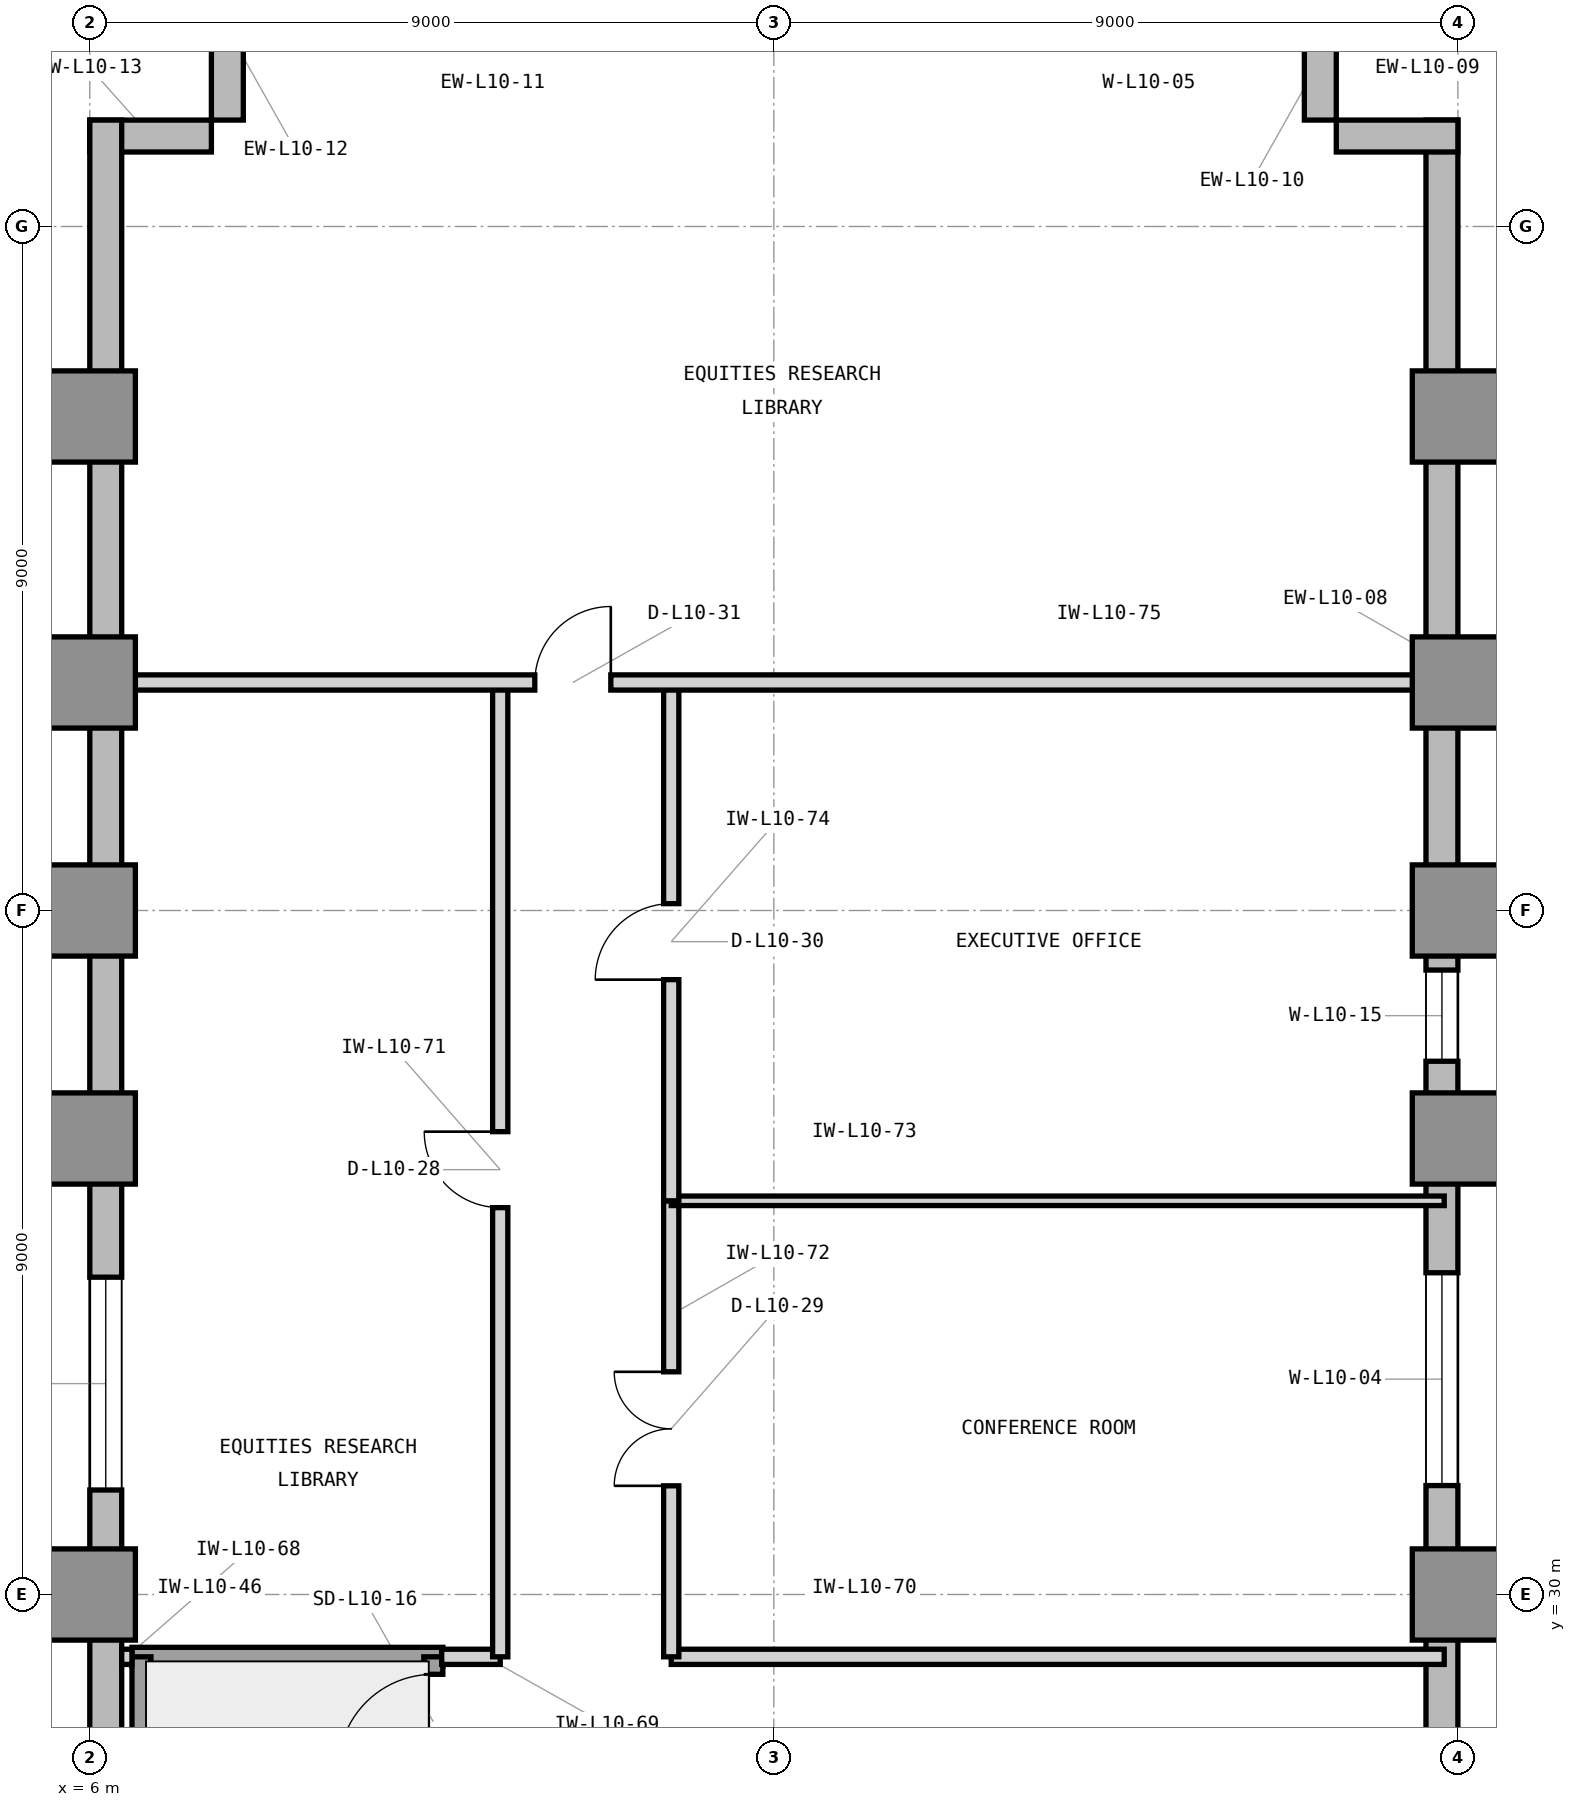
"""IFC4 building model, lengths in metres.
Left out: names, types, materials, properties, quantities, classifications, styles, units other than length and angle.
Written with IfcOpenShell. Run it as: python <this file> out.ifc"""

import sys

from ifc_helpers import new_model, si_unit, direction, frame, frame_2d, origin, origin_2d, place, context, subcontext, project, spatial, rectangle, extrude, element, fill, save


model = new_model("IFC4")
c1 = context("Model", 3, precision=1e-05, world=origin(), true_north=direction((0.0, 1.0)))
c2 = subcontext(c1, "Body", "Model", "MODEL_VIEW")
j1 = project(units=[si_unit("LENGTHUNIT", "METRE"), si_unit("PLANEANGLEUNIT", "RADIAN")], contexts=[c1])
p1 = place(None, origin())
s1 = spatial("IfcSite", under=j1, at=p1, CompositionType="ELEMENT")
p2 = place(p1, origin())
s2 = spatial("IfcBuilding", under=s1, at=p2, CompositionType="ELEMENT")
p3 = place(p2, frame((0.0, 0.0, 46.8)))
s3 = spatial("IfcBuildingStorey", under=s2, at=p3, CompositionType="ELEMENT", Elevation=46.8)
for number, where, z_axis, x_axis in (
    (1, (6.0, 30.0, 0.0), (0.0, 0.0, 1.0), (1.0, 0.0, 0.0)),
    (2, (24.0, 30.0, 0.0), (0.0, 0.0, 1.0), (1.0, 0.0, 0.0)),
    (3, (6.0, 36.0, 0.0), (0.0, 0.0, 1.0), (1.0, 0.0, 0.0)),
    (4, (24.0, 36.0, 0.0), (0.0, 0.0, 1.0), (1.0, 0.0, 0.0)),
    (5, (6.0, 39.0, 0.0), (0.0, 0.0, 1.0), (1.0, 0.0, 0.0)),
    (6, (24.0, 39.0, 0.0), (0.0, 0.0, 1.0), (1.0, 0.0, 0.0)),
    (7, (6.0, 42.0, 0.0), (0.0, 0.0, 1.0), (1.0, 0.0, 0.0)),
    (8, (24.0, 42.0, 0.0), (0.0, 0.0, 1.0), (1.0, 0.0, 0.0)),
    (9, (6.0, 45.5, 0.0), (0.0, 0.0, 1.0), (1.0, 0.0, 0.0)),
    (10, (24.0, 45.5, 0.0), (0.0, 0.0, 1.0), (1.0, 0.0, 0.0)),
):
    element("IfcColumn", number, at=place(p3, frame(where, z_axis=z_axis, x_axis=x_axis)), inside=s3, PredefinedType="COLUMN", context=c2, shape_type="SweptSolid", body=[
        extrude(rectangle(XDim=1.2, YDim=1.2, at=origin_2d()), origin(), (0.0, 0.0, 1.0), 4.2),
    ])
p4 = place(p3, frame((23.79, 21.0, 0.0), z_axis=(0.0, 0.0, 1.0), x_axis=(0.0, 1.0, 0.0)))
e11 = element("IfcWall", 11, at=p4, inside=s3, PredefinedType="STANDARD", context=c2, shape_type="SweptSolid", body=[
    extrude(rectangle(XDim=28.4, YDim=0.42, at=frame_2d((14.2, 0.0))), origin(), (0.0, 0.0, 1.0), 3.98),
])
p5 = place(p4, frame((10.433, 0.0, 0.85)))
e12 = element("IfcOpeningElement", 12, at=p5, cuts=e11, PredefinedType="OPENING", context=c2, shape_type="SweptSolid", body=[
    extrude(rectangle(XDim=2.8, YDim=2.45, at=frame_2d((1.4, 1.225))), frame((0.0, 0.22, 0.0), z_axis=(0.0, -1.0, 0.0), x_axis=(1.0, 0.0, 0.0)), (0.0, 0.0, 1.0), 0.44),
])
p6 = place(p4, frame((16.016, 0.0, 0.85)))
e13 = element("IfcOpeningElement", 13, at=p6, cuts=e11, PredefinedType="OPENING", context=c2, shape_type="SweptSolid", body=[
    extrude(rectangle(XDim=1.2, YDim=2.45, at=frame_2d((0.6, 1.225))), frame((0.0, 0.22, 0.0), z_axis=(0.0, -1.0, 0.0), x_axis=(1.0, 0.0, 0.0)), (0.0, 0.0, 1.0), 0.44),
])
for number, where, z_axis, x_axis in (
    (14, (24.0, 49.19, 0.0), (0.0, 0.0, 1.0), (-1.0, 0.0, 0.0)),
    (15, (22.19, 49.4, 0.0), (0.0, 0.0, 1.0), (0.0, 1.0, 0.0)),
    (16, (7.81, 51.0, 0.0), (0.0, 0.0, 1.0), (0.0, -1.0, 0.0)),
    (17, (7.6, 49.19, 0.0), (0.0, 0.0, 1.0), (-1.0, 0.0, 0.0)),
):
    element("IfcWall", number, at=place(p3, frame(where, z_axis=z_axis, x_axis=x_axis)), inside=s3, PredefinedType="STANDARD", context=c2, shape_type="SweptSolid", body=[
        extrude(rectangle(XDim=1.6, YDim=0.42, at=frame_2d((0.8, 0.0))), origin(), (0.0, 0.0, 1.0), 3.98),
    ])
p7 = place(p3, frame((6.21, 49.4, 0.0), z_axis=(0.0, 0.0, 1.0), x_axis=(0.0, -1.0, 0.0)))
e18 = element("IfcWall", 18, at=p7, inside=s3, PredefinedType="STANDARD", context=c2, shape_type="SweptSolid", body=[
    extrude(rectangle(XDim=28.5, YDim=0.42, at=frame_2d((14.25, 0.0))), origin(), (0.0, 0.0, 1.0), 3.98),
])
p8 = place(p7, frame((15.225, 0.0, 0.85)))
e19 = element("IfcOpeningElement", 19, at=p8, cuts=e18, PredefinedType="OPENING", context=c2, shape_type="SweptSolid", body=[
    extrude(rectangle(XDim=2.8, YDim=2.45, at=frame_2d((1.4, 1.225))), frame((0.0, 0.22, 0.0), z_axis=(0.0, -1.0, 0.0), x_axis=(1.0, 0.0, 0.0)), (0.0, 0.0, 1.0), 0.44),
])
p9 = place(p3, frame((6.555, 29.18, 0.0), z_axis=(0.0, 0.0, 1.0), x_axis=(1.0, 0.0, 0.0)))
e20 = element("IfcWall", 20, at=p9, inside=s3, PredefinedType="SHEAR", context=c2, shape_type="SweptSolid", body=[
    extrude(rectangle(XDim=4.09, YDim=0.25, at=frame_2d((2.045, 0.0))), origin(), (0.0, 0.0, 1.0), 4.2),
])
p10 = place(p3, frame((6.68, 21.68, 0.0), z_axis=(0.0, 0.0, 1.0), x_axis=(0.0, 1.0, 0.0)))
e21 = element("IfcWall", 21, at=p10, inside=s3, PredefinedType="SHEAR", context=c2, shape_type="SweptSolid", body=[
    extrude(rectangle(XDim=7.5, YDim=0.25, at=frame_2d((3.75, 0.0))), origin(), (0.0, 0.0, 1.0), 4.2),
])
p11 = place(p3, frame((10.52, 21.68, 0.0), z_axis=(0.0, 0.0, 1.0), x_axis=(0.0, 1.0, 0.0)))
e22 = element("IfcWall", 22, at=p11, inside=s3, PredefinedType="SHEAR", context=c2, shape_type="SweptSolid", body=[
    extrude(rectangle(XDim=7.5, YDim=0.25, at=frame_2d((3.75, 0.0))), origin(), (0.0, 0.0, 1.0), 4.2),
])
p12 = place(p11, frame((6.02, 0.0, 0.0)))
e23 = element("IfcOpeningElement", 23, at=p12, cuts=e22, PredefinedType="OPENING", context=c2, shape_type="SweptSolid", body=[
    extrude(rectangle(XDim=1.25, YDim=2.2, at=frame_2d((0.625, 1.1))), frame((0.0, 0.135, 0.0), z_axis=(0.0, -1.0, 0.0), x_axis=(1.0, 0.0, 0.0)), (0.0, 0.0, 1.0), 0.27),
])
p13 = place(p3, frame((6.42, 29.18, 0.0), z_axis=(0.0, 0.0, 1.0), x_axis=(1.0, 0.0, 0.0)))
e24 = element("IfcWall", 24, at=p13, inside=s3, PredefinedType="PARTITIONING", context=c2, shape_type="SweptSolid", body=[
    extrude(rectangle(XDim=0.135, YDim=0.2, at=frame_2d((0.067, 0.0))), origin(), (0.0, 0.0, 1.0), 3.97),
])
p14 = place(p3, frame((10.63, 29.18, 0.0), z_axis=(0.0, 0.0, 1.0), x_axis=(1.0, 0.0, 0.0)))
e25 = element("IfcWall", 25, at=p14, inside=s3, PredefinedType="PARTITIONING", context=c2, shape_type="SweptSolid", body=[
    extrude(rectangle(XDim=0.77, YDim=0.2, at=frame_2d((0.385, 0.0))), origin(), (0.0, 0.0, 1.0), 3.97),
])
p15 = place(p3, frame((13.65, 29.18, 0.0), z_axis=(0.0, 0.0, 1.0), x_axis=(1.0, 0.0, 0.0)))
e26 = element("IfcWall", 26, at=p15, inside=s3, PredefinedType="PARTITIONING", context=c2, shape_type="SweptSolid", body=[
    extrude(rectangle(XDim=10.17, YDim=0.2, at=frame_2d((5.085, 0.0))), origin(), (0.0, 0.0, 1.0), 3.97),
])
p16 = place(p3, frame((11.4, 29.18, 0.0), z_axis=(0.0, 0.0, 1.0), x_axis=(0.0, 1.0, 0.0)))
e27 = element("IfcWall", 27, at=p16, inside=s3, PredefinedType="PARTITIONING", context=c2, shape_type="SweptSolid", body=[
    extrude(rectangle(XDim=12.82, YDim=0.2, at=frame_2d((6.41, 0.0))), origin(), (0.0, 0.0, 1.0), 3.97),
])
p17 = place(p16, frame((5.91, 0.0, 0.0)))
e28 = element("IfcOpeningElement", 28, at=p17, cuts=e27, PredefinedType="OPENING", context=c2, shape_type="SweptSolid", body=[
    extrude(rectangle(XDim=1.0, YDim=2.15, at=frame_2d((0.5, 1.075))), frame((0.0, 0.11, 0.0), z_axis=(0.0, -1.0, 0.0), x_axis=(1.0, 0.0, 0.0)), (0.0, 0.0, 1.0), 0.22),
])
p18 = place(p3, frame((13.65, 29.18, 0.0), z_axis=(0.0, 0.0, 1.0), x_axis=(0.0, 1.0, 0.0)))
e29 = element("IfcWall", 29, at=p18, inside=s3, PredefinedType="PARTITIONING", context=c2, shape_type="SweptSolid", body=[
    extrude(rectangle(XDim=6.0, YDim=0.2, at=frame_2d((3.0, 0.0))), origin(), (0.0, 0.0, 1.0), 3.97),
])
p19 = place(p18, frame((2.25, 0.0, 0.0)))
e30 = element("IfcOpeningElement", 30, at=p19, cuts=e29, PredefinedType="OPENING", context=c2, shape_type="SweptSolid", body=[
    extrude(rectangle(XDim=1.5, YDim=2.3, at=frame_2d((0.75, 1.15))), frame((0.0, 0.11, 0.0), z_axis=(0.0, -1.0, 0.0), x_axis=(1.0, 0.0, 0.0)), (0.0, 0.0, 1.0), 0.22),
])
p20 = place(p3, frame((13.65, 35.18, 0.0), z_axis=(0.0, 0.0, 1.0), x_axis=(1.0, 0.0, 0.0)))
e31 = element("IfcWall", 31, at=p20, inside=s3, PredefinedType="PARTITIONING", context=c2, shape_type="SweptSolid", body=[
    extrude(rectangle(XDim=10.17, YDim=0.125, at=frame_2d((5.085, 0.0))), origin(), (0.0, 0.0, 1.0), 3.97),
])
p21 = place(p3, frame((13.65, 35.18, 0.0), z_axis=(0.0, 0.0, 1.0), x_axis=(0.0, 1.0, 0.0)))
e32 = element("IfcWall", 32, at=p21, inside=s3, PredefinedType="PARTITIONING", context=c2, shape_type="SweptSolid", body=[
    extrude(rectangle(XDim=6.82, YDim=0.2, at=frame_2d((3.41, 0.0))), origin(), (0.0, 0.0, 1.0), 3.97),
])
p22 = place(p21, frame((2.91, 0.0, 0.0)))
e33 = element("IfcOpeningElement", 33, at=p22, cuts=e32, PredefinedType="OPENING", context=c2, shape_type="SweptSolid", body=[
    extrude(rectangle(XDim=1.0, YDim=2.15, at=frame_2d((0.5, 1.075))), frame((0.0, 0.11, 0.0), z_axis=(0.0, -1.0, 0.0), x_axis=(1.0, 0.0, 0.0)), (0.0, 0.0, 1.0), 0.22),
])
p23 = place(p3, frame((6.18, 42.0, 0.0), z_axis=(0.0, 0.0, 1.0), x_axis=(1.0, 0.0, 0.0)))
e34 = element("IfcWall", 34, at=p23, inside=s3, PredefinedType="PARTITIONING", context=c2, shape_type="SweptSolid", body=[
    extrude(rectangle(XDim=17.64, YDim=0.2, at=frame_2d((8.82, 0.0))), origin(), (0.0, 0.0, 1.0), 3.114),
])
p24 = place(p23, frame((5.675, 0.0, 0.0)))
e35 = element("IfcOpeningElement", 35, at=p24, cuts=e34, PredefinedType="OPENING", context=c2, shape_type="SweptSolid", body=[
    extrude(rectangle(XDim=1.0, YDim=2.15, at=frame_2d((0.5, 1.075))), frame((0.0, 0.11, 0.0), z_axis=(0.0, -1.0, 0.0), x_axis=(1.0, 0.0, 0.0)), (0.0, 0.0, 1.0), 0.22),
])
p25 = place(p5, origin())
e36 = element("IfcWindow", 36, at=p25, inside=s3, PartitioningType="SINGLE_PANEL", PredefinedType="WINDOW", context=c2, shape_type="SweptSolid", body=[
    extrude(rectangle(XDim=2.8, YDim=2.45, at=frame_2d((1.4, 1.225))), frame((0.0, 0.11, 0.0), z_axis=(0.0, -1.0, 0.0), x_axis=(1.0, 0.0, 0.0)), (0.0, 0.0, 1.0), 0.06),
])
fill(e12, e36)
p26 = place(p8, origin())
e37 = element("IfcWindow", 37, at=p26, inside=s3, PartitioningType="SINGLE_PANEL", PredefinedType="WINDOW", context=c2, shape_type="SweptSolid", body=[
    extrude(rectangle(XDim=2.8, YDim=2.45, at=frame_2d((1.4, 1.225))), frame((0.0, 0.11, 0.0), z_axis=(0.0, -1.0, 0.0), x_axis=(1.0, 0.0, 0.0)), (0.0, 0.0, 1.0), 0.06),
])
fill(e19, e37)
p27 = place(p12, origin())
e38 = element("IfcDoor", 38, at=p27, inside=s3, OperationType="SINGLE_SWING_LEFT", PredefinedType="DOOR", context=c2, shape_type="SweptSolid", body=[
    extrude(rectangle(XDim=1.25, YDim=2.2, at=frame_2d((0.625, 1.1))), frame((0.0, 0.025, 0.0), z_axis=(0.0, -1.0, 0.0), x_axis=(1.0, 0.0, 0.0)), (0.0, 0.0, 1.0), 0.05),
])
fill(e23, e38)
p28 = place(p17, origin())
e39 = element("IfcDoor", 39, at=p28, inside=s3, OperationType="SINGLE_SWING_RIGHT", PredefinedType="DOOR", context=c2, shape_type="SweptSolid", body=[
    extrude(rectangle(XDim=1.0, YDim=2.15, at=frame_2d((0.5, 1.075))), frame((0.0, 0.025, 0.0), z_axis=(0.0, -1.0, 0.0), x_axis=(1.0, 0.0, 0.0)), (0.0, 0.0, 1.0), 0.05),
])
fill(e28, e39)
p29 = place(p19, origin())
e40 = element("IfcDoor", 40, at=p29, inside=s3, OperationType="DOUBLE_DOOR_SINGLE_SWING", PredefinedType="DOOR", context=c2, shape_type="SweptSolid", body=[
    extrude(rectangle(XDim=1.5, YDim=2.3, at=frame_2d((0.75, 1.15))), frame((0.0, 0.025, 0.0), z_axis=(0.0, -1.0, 0.0), x_axis=(1.0, 0.0, 0.0)), (0.0, 0.0, 1.0), 0.05),
])
fill(e30, e40)
p30 = place(p22, origin())
e41 = element("IfcDoor", 41, at=p30, inside=s3, OperationType="SINGLE_SWING_LEFT", PredefinedType="DOOR", context=c2, shape_type="SweptSolid", body=[
    extrude(rectangle(XDim=1.0, YDim=2.15, at=frame_2d((0.5, 1.075))), frame((0.0, 0.025, 0.0), z_axis=(0.0, -1.0, 0.0), x_axis=(1.0, 0.0, 0.0)), (0.0, 0.0, 1.0), 0.05),
])
fill(e33, e41)
p31 = place(p24, origin())
e42 = element("IfcDoor", 42, at=p31, inside=s3, OperationType="SINGLE_SWING_RIGHT", PredefinedType="DOOR", context=c2, shape_type="SweptSolid", body=[
    extrude(rectangle(XDim=1.0, YDim=2.15, at=frame_2d((0.5, 1.075))), frame((0.0, 0.025, 0.0), z_axis=(0.0, -1.0, 0.0), x_axis=(1.0, 0.0, 0.0)), (0.0, 0.0, 1.0), 0.05),
])
fill(e35, e42)
p32 = place(p6, origin())
e43 = element("IfcWindow", 43, at=p32, inside=s3, PartitioningType="SINGLE_PANEL", PredefinedType="WINDOW", context=c2, shape_type="SweptSolid", body=[
    extrude(rectangle(XDim=1.2, YDim=2.45, at=frame_2d((0.6, 1.225))), frame((0.0, 0.11, 0.0), z_axis=(0.0, -1.0, 0.0), x_axis=(1.0, 0.0, 0.0)), (0.0, 0.0, 1.0), 0.06),
])
fill(e13, e43)
save(model, sys.argv[1])
